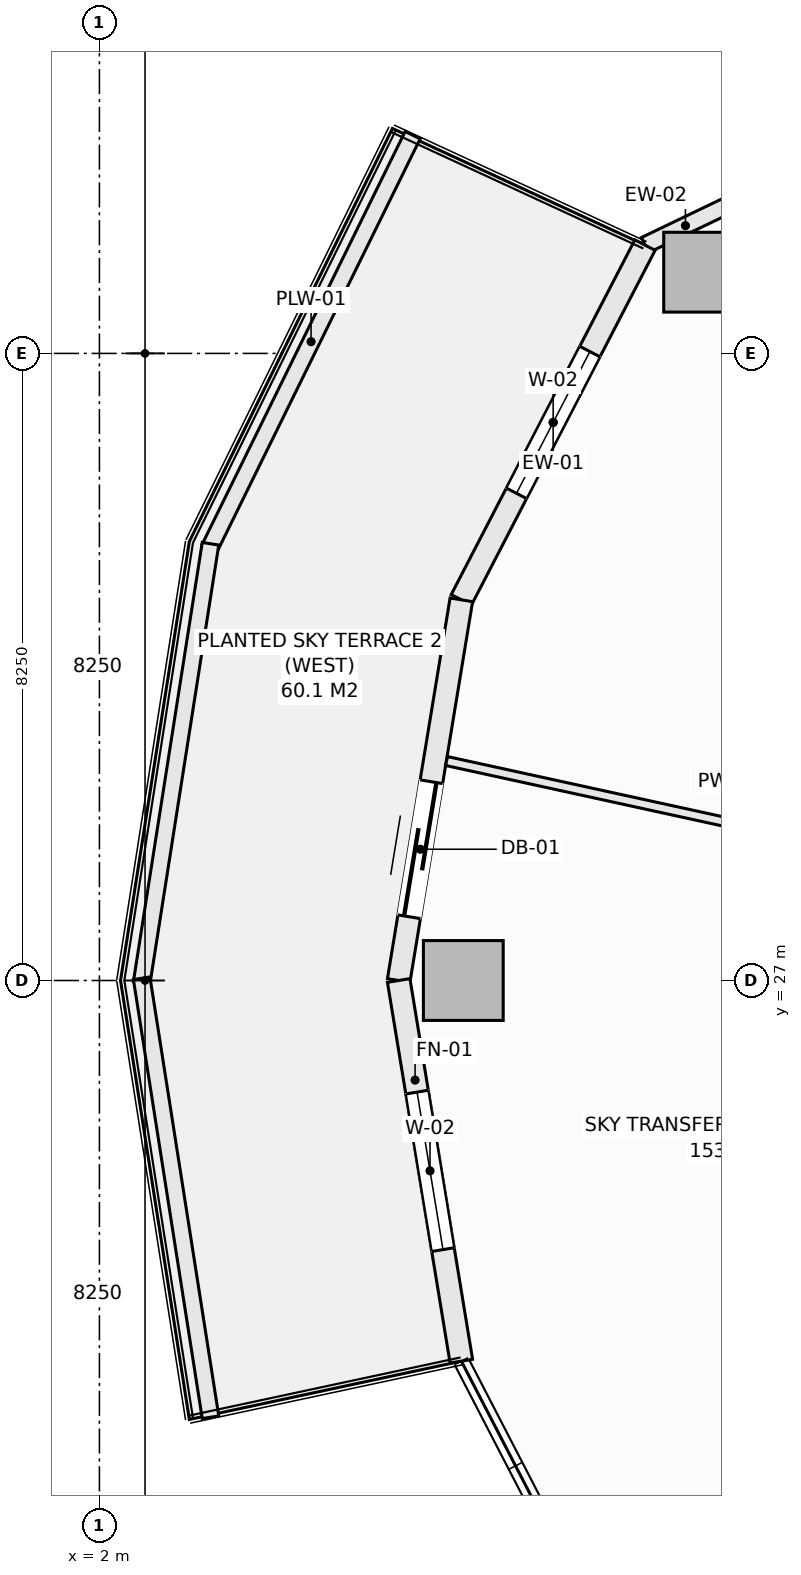
"""IFC4 building model, lengths in metres.
Left out: names, types, materials, properties, quantities, classifications, styles, units other than length and angle.
Written with IfcOpenShell. Run it as: python <this file> out.ifc"""

import sys

from ifc_helpers import new_model, si_unit, direction, frame, frame_2d, origin, origin_2d, place, context, subcontext, project, spatial, rectangle, extrude, element, fill, save


model = new_model("IFC4")
c1 = context("Model", 3, precision=1e-05, world=origin(), true_north=direction((0.0, 1.0)))
c2 = subcontext(c1, "Body", "Model", "MODEL_VIEW")
j1 = project(units=[si_unit("LENGTHUNIT", "METRE"), si_unit("PLANEANGLEUNIT", "RADIAN")], contexts=[c1])
p1 = place(None, origin())
s1 = spatial("IfcSite", under=j1, at=p1, CompositionType="ELEMENT")
p2 = place(p1, origin())
s2 = spatial("IfcBuilding", under=s1, at=p2, CompositionType="ELEMENT")
p3 = place(p2, frame((0.0, 0.0, 100.8)))
s3 = spatial("IfcBuildingStorey", under=s2, at=p3, CompositionType="ELEMENT", Elevation=100.8)
for number, where, z_axis, x_axis in (
    (1, (9.95, 36.319, -0.28), (0.0, 0.0, 1.0), (1.0, 0.0, 0.0)),
    (2, (6.788, 27.0, -0.28), (0.0, 0.0, 1.0), (1.0, 0.0, 0.0)),
):
    element("IfcColumn", number, at=place(p3, frame(where, z_axis=z_axis, x_axis=x_axis)), inside=s3, PredefinedType="COLUMN", context=c2, shape_type="SweptSolid", body=[
        extrude(rectangle(XDim=1.05, YDim=1.05, at=origin_2d()), origin(), (0.0, 0.0, 1.0), 4.51),
    ])
p4 = place(p3, frame((9.178, 36.675, 0.0), z_axis=(0.0, 0.0, 1.0), x_axis=(0.901426247285, 0.432932697664, 0.0)))
e3 = element("IfcWall", 3, at=p4, inside=s3, PredefinedType="SOLIDWALL", context=c2, shape_type="SweptSolid", body=[
    extrude(rectangle(XDim=1.181, YDim=0.22, at=frame_2d((0.59, 0.0))), origin(), (0.0, 0.0, 1.0), 3.753),
])
p5 = place(p3, frame((6.762, 32.008, 0.0), z_axis=(0.0, 0.0, 1.0), x_axis=(0.459767899643, 0.888039119892, 0.0)))
e4 = element("IfcWall", 4, at=p5, inside=s3, PredefinedType="SOLIDWALL", context=c2, shape_type="SweptSolid", body=[
    extrude(rectangle(XDim=5.255, YDim=0.3, at=frame_2d((2.628, 0.0))), origin(), (0.0, 0.0, 1.0), 3.753),
])
p6 = place(p5, frame((1.578, 0.0, 0.74)))
e5 = element("IfcOpeningElement", 5, at=p6, cuts=e4, PredefinedType="OPENING", context=c2, shape_type="SweptSolid", body=[
    extrude(rectangle(XDim=2.1, YDim=1.7, at=frame_2d((1.05, 0.85))), frame((0.0, 0.16, 0.0), z_axis=(0.0, -1.0, 0.0), x_axis=(1.0, 0.0, 0.0)), (0.0, 0.0, 1.0), 0.32),
])
p7 = place(p3, frame((5.938, 27.0, 0.0), z_axis=(0.0, 0.0, 1.0), x_axis=(0.162393944769, 0.986726003864, 0.0)))
e6 = element("IfcWall", 6, at=p7, inside=s3, PredefinedType="SOLIDWALL", context=c2, shape_type="SweptSolid", body=[
    extrude(rectangle(XDim=5.075, YDim=0.3, at=frame_2d((2.538, 0.0))), origin(), (0.0, 0.0, 1.0), 3.753),
])
p8 = place(p7, frame((0.85, 0.0, 0.0)))
e7 = element("IfcOpeningElement", 7, at=p8, cuts=e6, PredefinedType="OPENING", context=c2, shape_type="SweptSolid", body=[
    extrude(rectangle(XDim=1.8, YDim=2.25, at=frame_2d((0.9, 1.125))), frame((0.0, 0.16, 0.0), z_axis=(0.0, -1.0, 0.0), x_axis=(1.0, 0.0, 0.0)), (0.0, 0.0, 1.0), 0.32),
])
p9 = place(p3, frame((5.938, 27.0, 0.0), z_axis=(0.0, 0.0, 1.0), x_axis=(0.162393944769, -0.986726003864, 0.0)))
e8 = element("IfcWall", 8, at=p9, inside=s3, PredefinedType="SOLIDWALL", context=c2, shape_type="SweptSolid", body=[
    extrude(rectangle(XDim=5.075, YDim=0.3, at=frame_2d((2.538, 0.0))), origin(), (0.0, 0.0, 1.0), 3.753),
])
p10 = place(p9, frame((1.488, 0.0, 0.74)))
e9 = element("IfcOpeningElement", 9, at=p10, cuts=e8, PredefinedType="OPENING", context=c2, shape_type="SweptSolid", body=[
    extrude(rectangle(XDim=2.1, YDim=1.7, at=frame_2d((1.05, 0.85))), frame((0.0, 0.16, 0.0), z_axis=(0.0, -1.0, 0.0), x_axis=(1.0, 0.0, 0.0)), (0.0, 0.0, 1.0), 0.32),
])
p11 = place(p3, frame((3.449, 32.687, 0.0), z_axis=(0.0, 0.0, 1.0), x_axis=(0.441269631716, 0.897374566235, 0.0)))
e10 = element("IfcWall", 10, at=p11, inside=s3, PredefinedType="PARAPET", context=c2, shape_type="SweptSolid", body=[
    extrude(rectangle(XDim=6.056, YDim=0.22, at=frame_2d((3.028, 0.0))), origin(), (0.0, 0.0, 1.0), 0.52),
])
for number, where, z_axis, x_axis in (
    (11, (2.556, 26.971, 0.0), (0.0, 0.0, 1.0), (0.155, 0.988, 0.0)),
    (12, (2.556, 27.029, 0.0), (0.0, 0.0, 1.0), (0.155, -0.988, 0.0)),
):
    element("IfcWall", number, at=place(p3, frame(where, z_axis=z_axis, x_axis=x_axis)), inside=s3, PredefinedType="PARAPET", context=c2, shape_type="SweptSolid", body=[
        extrude(rectangle(XDim=5.846, YDim=0.22, at=frame_2d((2.923, 0.0))), origin(), (0.0, 0.0, 1.0), 0.52),
    ])
p12 = place(p3, frame((6.567, 29.887, 0.0), z_axis=(0.0, 0.0, 1.0), x_axis=(0.976956632184, -0.213437903927, 0.0)))
e13 = element("IfcWall", 13, at=p12, inside=s3, PredefinedType="PARTITIONING", context=c2, shape_type="SweptSolid", body=[
    extrude(rectangle(XDim=7.76, YDim=0.12, at=frame_2d((3.88, 0.0))), origin(), (0.0, 0.0, 1.0), 4.23),
])
p13 = place(p6, origin())
e14 = element("IfcWindow", 14, at=p13, inside=s3, PartitioningType="SINGLE_PANEL", PredefinedType="WINDOW", context=c2, shape_type="SweptSolid", body=[
    extrude(rectangle(XDim=2.1, YDim=1.7, at=frame_2d((1.05, 0.85))), frame((0.0, 0.03, 0.0), z_axis=(0.0, -1.0, 0.0), x_axis=(1.0, 0.0, 0.0)), (0.0, 0.0, 1.0), 0.06),
])
fill(e5, e14)
p14 = place(p8, origin())
e15 = element("IfcDoor", 15, at=p14, inside=s3, OperationType="SLIDING_TO_LEFT", PredefinedType="DOOR", context=c2, shape_type="SweptSolid", body=[
    extrude(rectangle(XDim=1.8, YDim=2.25, at=frame_2d((0.9, 1.125))), frame((0.0, 0.025, 0.0), z_axis=(0.0, -1.0, 0.0), x_axis=(1.0, 0.0, 0.0)), (0.0, 0.0, 1.0), 0.05),
])
fill(e7, e15)
p15 = place(p10, origin())
e16 = element("IfcWindow", 16, at=p15, inside=s3, PartitioningType="SINGLE_PANEL", PredefinedType="WINDOW", context=c2, shape_type="SweptSolid", body=[
    extrude(rectangle(XDim=2.1, YDim=1.7, at=frame_2d((1.05, 0.85))), frame((0.0, 0.03, 0.0), z_axis=(0.0, -1.0, 0.0), x_axis=(1.0, 0.0, 0.0)), (0.0, 0.0, 1.0), 0.06),
])
fill(e9, e16)
save(model, sys.argv[1])
